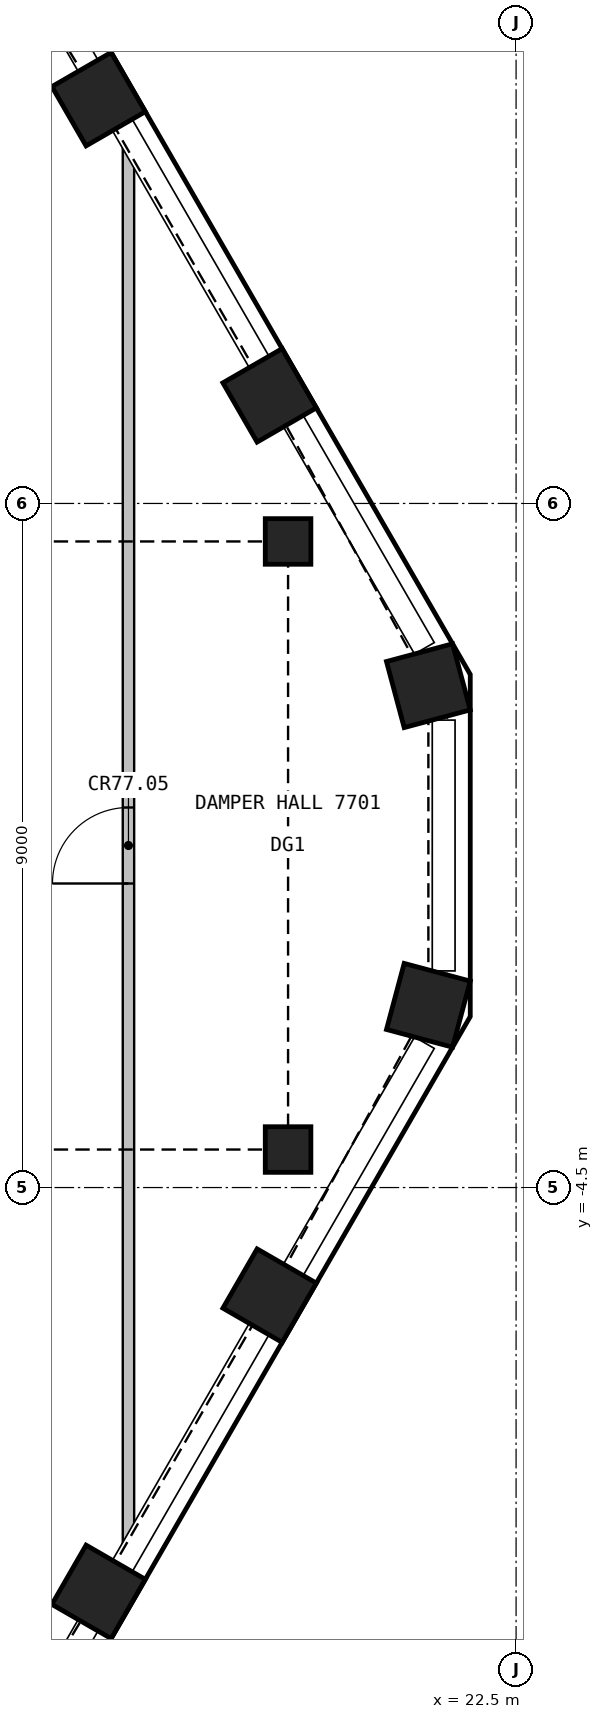
"""IFC4 building model, lengths in metres.
Left out: names, types, materials, properties, quantities, classifications, styles, units other than length and angle.
Written with IfcOpenShell. Run it as: python <this file> out.ifc"""

import sys

from ifc_helpers import new_model, si_unit, direction, frame, frame_2d, origin, origin_2d, place, context, subcontext, project, spatial, polyline, rectangle, hollow_rectangle, outline, extrude, element, fill, save


model = new_model("IFC4")
c1 = context("Model", 3, precision=1e-05, world=origin(), true_north=direction((0.0, 1.0)))
c2 = subcontext(c1, "Body", "Model", "MODEL_VIEW")
j1 = project(units=[si_unit("LENGTHUNIT", "METRE"), si_unit("PLANEANGLEUNIT", "RADIAN")], contexts=[c1])
p1 = place(None, origin())
s1 = spatial("IfcSite", under=j1, at=p1, CompositionType="ELEMENT")
p2 = place(p1, origin())
s2 = spatial("IfcBuilding", under=s1, at=p2, CompositionType="ELEMENT")
p3 = place(p2, frame((0.0, 0.0, 309.9)))
s3 = spatial("IfcBuildingStorey", under=s2, at=p3, CompositionType="ELEMENT", Elevation=309.9)
for number, where, z_axis, x_axis in (
    (1, (17.007, -9.819, 0.0), (0.0, 0.0, 1.0), (0.5, 0.866, 0.0)),
    (2, (19.257, -5.922, 0.0), (0.0, 0.0, 1.0), (0.5, 0.866, 0.0)),
    (3, (21.346, -2.102, 0.0), (0.0, 0.0, 1.0), (0.259, 0.966, 0.0)),
    (4, (21.346, 2.102, 0.0), (0.0, 0.0, 1.0), (-0.259, 0.966, 0.0)),
    (5, (19.257, 5.922, 0.0), (0.0, 0.0, 1.0), (-0.5, 0.866, 0.0)),
    (6, (17.007, 9.819, 0.0), (0.0, 0.0, 1.0), (-0.5, 0.866, 0.0)),
):
    element("IfcColumn", number, at=place(p3, frame(where, z_axis=z_axis, x_axis=x_axis)), inside=s3, PredefinedType="COLUMN", context=c2, shape_type="SweptSolid", body=[
        extrude(rectangle(XDim=0.9, YDim=0.9, at=origin_2d()), origin(), (0.0, 0.0, 1.0), 8.55),
    ])
for number, where, z_axis, x_axis in (
    (7, (19.5, -4.0, 0.0), (0.0, 0.0, 1.0), (1.0, 0.0, 0.0)),
    (8, (19.5, 4.0, 0.0), (0.0, 0.0, 1.0), (1.0, 0.0, 0.0)),
):
    element("IfcColumn", number, at=place(p3, frame(where, z_axis=z_axis, x_axis=x_axis)), inside=s3, PredefinedType="COLUMN", context=c2, shape_type="SweptSolid", body=[
        extrude(hollow_rectangle(XDim=0.6, YDim=0.6, WallThickness=0.04, at=origin_2d()), origin(), (0.0, 0.0, 1.0), 7.617),
    ])
p4 = place(p3, origin())
e9 = element("IfcWall", 9, at=p4, inside=s3, PredefinedType="PARAPET", context=c2, shape_type="SweptSolid", body=[
    extrude(outline(polyline([(21.897, -13.941), (24.147, -10.044), (23.931, -9.919), (21.681, -13.816), (21.897, -13.941)])), origin(), (0.0, 0.0, 1.0), 1.1),
])
p5 = place(p3, origin())
e10 = element("IfcWall", 10, at=p5, inside=s3, PredefinedType="PARAPET", context=c2, shape_type="SweptSolid", body=[
    extrude(outline(polyline([(24.147, 10.044), (21.897, 13.941), (21.681, 13.816), (23.931, 9.919), (24.147, 10.044)])), origin(), (0.0, 0.0, 1.0), 1.1),
])
p6 = place(p3, frame((17.4, -9.439, 0.0), z_axis=(0.0, 0.0, 1.0), x_axis=(0.0, 1.0, 0.0)))
e11 = element("IfcWall", 11, at=p6, inside=s3, PredefinedType="PARTITIONING", context=c2, shape_type="SweptSolid", body=[
    extrude(rectangle(XDim=18.878, YDim=0.15, at=frame_2d((9.439, 0.0))), origin(), (0.0, 0.0, 1.0), 8.55),
])
p7 = place(p6, frame((8.939, 0.0, 0.0)))
e12 = element("IfcOpeningElement", 12, at=p7, cuts=e11, PredefinedType="OPENING", context=c2, shape_type="SweptSolid", body=[
    extrude(rectangle(XDim=1.0, YDim=2.1, at=frame_2d((0.5, 1.05))), frame((0.0, 0.085, 0.0), z_axis=(0.0, -1.0, 0.0), x_axis=(1.0, 0.0, 0.0)), (0.0, 0.0, 1.0), 0.17),
])
p8 = place(p7, origin())
e13 = element("IfcDoor", 13, at=p8, inside=s3, OperationType="SINGLE_SWING_RIGHT", PredefinedType="DOOR", context=c2, shape_type="SweptSolid", body=[
    extrude(rectangle(XDim=1.0, YDim=2.1, at=frame_2d((0.5, 1.05))), frame((0.0, 0.025, 0.0), z_axis=(0.0, -1.0, 0.0), x_axis=(1.0, 0.0, 0.0)), (0.0, 0.0, 1.0), 0.05),
])
fill(e12, e13)
save(model, sys.argv[1])
